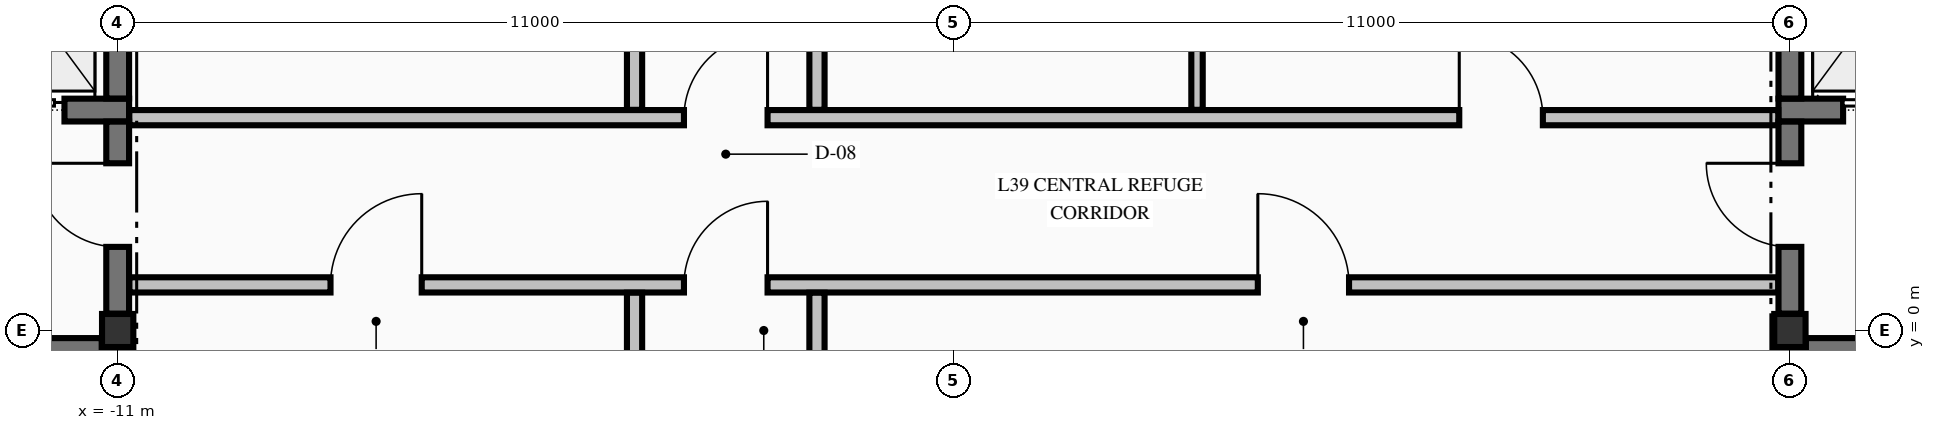
"""IFC4 building model, lengths in metres.
Left out: names, types, materials, properties, quantities, classifications, styles, units other than length and angle.
Written with IfcOpenShell. Run it as: python <this file> out.ifc"""

import sys

from ifc_helpers import new_model, si_unit, direction, frame, frame_2d, origin, origin_2d, place, context, subcontext, project, spatial, rectangle, i_section, extrude, element, fill, save


model = new_model("IFC4")
c1 = context("Model", 3, precision=1e-05, world=origin(), true_north=direction((0.0, 1.0)))
c2 = subcontext(c1, "Body", "Model", "MODEL_VIEW")
j1 = project(units=[si_unit("LENGTHUNIT", "METRE"), si_unit("PLANEANGLEUNIT", "RADIAN")], contexts=[c1])
p1 = place(None, origin())
s1 = spatial("IfcSite", under=j1, at=p1, CompositionType="ELEMENT")
p2 = place(p1, origin())
s2 = spatial("IfcBuilding", under=s1, at=p2, CompositionType="ELEMENT")
p3 = place(p2, frame((0.0, 0.0, 153.48)))
s3 = spatial("IfcBuildingStorey", under=s2, at=p3, CompositionType="ELEMENT", Elevation=153.48)
for number, where, z_axis, x_axis in (
    (1, (-11.0, 0.0, -0.425), (0.0, 0.0, 1.0), (1.0, 0.0, 0.0)),
    (2, (11.0, 0.0, -0.425), (0.0, 0.0, 1.0), (1.0, 0.0, 0.0)),
):
    element("IfcColumn", number, at=place(p3, frame(where, z_axis=z_axis, x_axis=x_axis)), inside=s3, PredefinedType="COLUMN", context=c2, shape_type="SweptSolid", body=[
        extrude(i_section(OverallWidth=0.412, OverallDepth=0.435, WebThickness=0.036, FlangeThickness=0.058, FilletRadius=0.015, at=origin_2d()), origin(), (0.0, 0.0, 1.0), 4.76),
    ])
p4 = place(p3, frame((-19.79, -0.25, 0.0), z_axis=(0.0, 0.0, 1.0), x_axis=(1.0, 0.0, 0.0)))
e3 = element("IfcWall", 3, at=p4, inside=s3, PredefinedType="SHEAR", context=c2, shape_type="SweptSolid", body=[
    extrude(rectangle(XDim=8.58, YDim=0.3, at=frame_2d((4.29, 0.0))), origin(), (0.0, 0.0, 1.0), 4.335),
])
p5 = place(p4, frame((6.09, 0.0, 0.0)))
e4 = element("IfcOpeningElement", 4, at=p5, cuts=e3, PredefinedType="OPENING", context=c2, shape_type="SweptSolid", body=[
    extrude(rectangle(XDim=1.1, YDim=2.15, at=frame_2d((0.55, 1.075))), frame((0.0, 0.16, 0.0), z_axis=(0.0, -1.0, 0.0), x_axis=(1.0, 0.0, 0.0)), (0.0, 0.0, 1.0), 0.32),
])
p6 = place(p3, frame((11.21, -0.25, 0.0), z_axis=(0.0, 0.0, 1.0), x_axis=(1.0, 0.0, 0.0)))
e5 = element("IfcWall", 5, at=p6, inside=s3, PredefinedType="SHEAR", context=c2, shape_type="SweptSolid", body=[
    extrude(rectangle(XDim=3.665, YDim=0.3, at=frame_2d((1.833, 0.0))), origin(), (0.0, 0.0, 1.0), 4.335),
])
p7 = place(p6, frame((1.39, 0.0, 0.0)))
e6 = element("IfcOpeningElement", 6, at=p7, cuts=e5, PredefinedType="OPENING", context=c2, shape_type="SweptSolid", body=[
    extrude(rectangle(XDim=1.1, YDim=2.15, at=frame_2d((0.55, 1.075))), frame((0.0, 0.16, 0.0), z_axis=(0.0, -1.0, 0.0), x_axis=(1.0, 0.0, 0.0)), (0.0, 0.0, 1.0), 0.32),
])
p8 = place(p3, frame((-14.875, 2.9, 0.0), z_axis=(0.0, 0.0, 1.0), x_axis=(1.0, 0.0, 0.0)))
e7 = element("IfcWall", 7, at=p8, inside=s3, PredefinedType="SHEAR", context=c2, shape_type="SweptSolid", body=[
    extrude(rectangle(XDim=4.025, YDim=0.3, at=frame_2d((2.012, 0.0))), origin(), (0.0, 0.0, 1.0), 4.335),
])
p9 = place(p8, frame((2.075, 0.0, 0.0)))
e8 = element("IfcOpeningElement", 8, at=p9, cuts=e7, PredefinedType="OPENING", context=c2, shape_type="SweptSolid", body=[
    extrude(rectangle(XDim=1.1, YDim=2.2, at=frame_2d((0.55, 1.1))), frame((0.0, 0.16, 0.0), z_axis=(0.0, -1.0, 0.0), x_axis=(1.0, 0.0, 0.0)), (0.0, 0.0, 1.0), 0.32),
])
p10 = place(p3, frame((10.85, 2.9, 0.0), z_axis=(0.0, 0.0, 1.0), x_axis=(1.0, 0.0, 0.0)))
e9 = element("IfcWall", 9, at=p10, inside=s3, PredefinedType="SHEAR", context=c2, shape_type="SweptSolid", body=[
    extrude(rectangle(XDim=4.025, YDim=0.3, at=frame_2d((2.012, 0.0))), origin(), (0.0, 0.0, 1.0), 4.335),
])
p11 = place(p10, frame((0.85, 0.0, 0.0)))
e10 = element("IfcOpeningElement", 10, at=p11, cuts=e9, PredefinedType="OPENING", context=c2, shape_type="SweptSolid", body=[
    extrude(rectangle(XDim=1.1, YDim=2.2, at=frame_2d((0.55, 1.1))), frame((0.0, 0.16, 0.0), z_axis=(0.0, -1.0, 0.0), x_axis=(1.0, 0.0, 0.0)), (0.0, 0.0, 1.0), 0.32),
])
p12 = place(p3, frame((-10.847, 0.6, 0.0), z_axis=(0.0, 0.0, 1.0), x_axis=(1.0, 0.0, 0.0)))
e11 = element("IfcWall", 11, at=p12, inside=s3, PredefinedType="PARTITIONING", context=c2, shape_type="SweptSolid", body=[
    extrude(rectangle(XDim=21.694, YDim=0.2, at=frame_2d((10.847, 0.0))), origin(), (0.0, 0.0, 1.0), 4.335),
])
p13 = place(p12, frame((7.297, 0.0, 0.0)))
e12 = element("IfcOpeningElement", 12, at=p13, cuts=e11, PredefinedType="OPENING", context=c2, shape_type="SweptSolid", body=[
    extrude(rectangle(XDim=1.1, YDim=2.15, at=frame_2d((0.55, 1.075))), frame((0.0, 0.11, 0.0), z_axis=(0.0, -1.0, 0.0), x_axis=(1.0, 0.0, 0.0)), (0.0, 0.0, 1.0), 0.22),
])
p14 = place(p12, frame((2.647, 0.0, 0.0)))
e13 = element("IfcOpeningElement", 13, at=p14, cuts=e11, PredefinedType="OPENING", context=c2, shape_type="SweptSolid", body=[
    extrude(rectangle(XDim=1.2, YDim=2.15, at=frame_2d((0.6, 1.075))), frame((0.0, 0.11, 0.0), z_axis=(0.0, -1.0, 0.0), x_axis=(1.0, 0.0, 0.0)), (0.0, 0.0, 1.0), 0.22),
])
p15 = place(p12, frame((14.847, 0.0, 0.0)))
e14 = element("IfcOpeningElement", 14, at=p15, cuts=e11, PredefinedType="OPENING", context=c2, shape_type="SweptSolid", body=[
    extrude(rectangle(XDim=1.2, YDim=2.15, at=frame_2d((0.6, 1.075))), frame((0.0, 0.11, 0.0), z_axis=(0.0, -1.0, 0.0), x_axis=(1.0, 0.0, 0.0)), (0.0, 0.0, 1.0), 0.22),
])
p16 = place(p3, frame((-10.847, 2.8, 0.0), z_axis=(0.0, 0.0, 1.0), x_axis=(1.0, 0.0, 0.0)))
e15 = element("IfcWall", 15, at=p16, inside=s3, PredefinedType="PARTITIONING", context=c2, shape_type="SweptSolid", body=[
    extrude(rectangle(XDim=21.694, YDim=0.2, at=frame_2d((10.847, 0.0))), origin(), (0.0, 0.0, 1.0), 4.335),
])
p17 = place(p16, frame((7.297, 0.0, 0.0)))
e16 = element("IfcOpeningElement", 16, at=p17, cuts=e15, PredefinedType="OPENING", context=c2, shape_type="SweptSolid", body=[
    extrude(rectangle(XDim=1.1, YDim=2.15, at=frame_2d((0.55, 1.075))), frame((0.0, 0.11, 0.0), z_axis=(0.0, -1.0, 0.0), x_axis=(1.0, 0.0, 0.0)), (0.0, 0.0, 1.0), 0.22),
])
p18 = place(p16, frame((17.497, 0.0, 0.0)))
e17 = element("IfcOpeningElement", 17, at=p18, cuts=e15, PredefinedType="OPENING", context=c2, shape_type="SweptSolid", body=[
    extrude(rectangle(XDim=1.1, YDim=2.15, at=frame_2d((0.55, 1.075))), frame((0.0, 0.11, 0.0), z_axis=(0.0, -1.0, 0.0), x_axis=(1.0, 0.0, 0.0)), (0.0, 0.0, 1.0), 0.22),
])
p19 = place(p3, frame((-11.0, -9.729, 0.0), z_axis=(0.0, 0.0, 1.0), x_axis=(0.0, 1.0, 0.0)))
e18 = element("IfcWall", 18, at=p19, inside=s3, PredefinedType="SHEAR", context=c2, shape_type="SweptSolid", body=[
    extrude(rectangle(XDim=9.507, YDim=0.3, at=frame_2d((4.753, 0.0))), origin(), (0.0, 0.0, 1.0), 4.335),
])
p20 = place(p3, frame((-11.0, 0.221, 0.0), z_axis=(0.0, 0.0, 1.0), x_axis=(0.0, 1.0, 0.0)))
e19 = element("IfcWall", 19, at=p20, inside=s3, PredefinedType="SHEAR", context=c2, shape_type="SweptSolid", body=[
    extrude(rectangle(XDim=2.527, YDim=0.3, at=frame_2d((1.263, 0.0))), origin(), (0.0, 0.0, 1.0), 4.335),
])
p21 = place(p20, frame((0.878, 0.0, 0.0)))
e20 = element("IfcOpeningElement", 20, at=p21, cuts=e19, PredefinedType="OPENING", context=c2, shape_type="SweptSolid", body=[
    extrude(rectangle(XDim=1.1, YDim=2.15, at=frame_2d((0.55, 1.075))), frame((0.0, 0.16, 0.0), z_axis=(0.0, -1.0, 0.0), x_axis=(1.0, 0.0, 0.0)), (0.0, 0.0, 1.0), 0.32),
])
p22 = place(p3, frame((-11.0, 3.052, 0.0), z_axis=(0.0, 0.0, 1.0), x_axis=(0.0, 1.0, 0.0)))
e21 = element("IfcWall", 21, at=p22, inside=s3, PredefinedType="SHEAR", context=c2, shape_type="SweptSolid", body=[
    extrude(rectangle(XDim=2.496, YDim=0.3, at=frame_2d((1.248, 0.0))), origin(), (0.0, 0.0, 1.0), 4.335),
])
p23 = place(p3, frame((11.0, -9.729, 0.0), z_axis=(0.0, 0.0, 1.0), x_axis=(0.0, 1.0, 0.0)))
e22 = element("IfcWall", 22, at=p23, inside=s3, PredefinedType="SHEAR", context=c2, shape_type="SweptSolid", body=[
    extrude(rectangle(XDim=9.507, YDim=0.3, at=frame_2d((4.753, 0.0))), origin(), (0.0, 0.0, 1.0), 4.335),
])
p24 = place(p3, frame((11.0, 0.221, 0.0), z_axis=(0.0, 0.0, 1.0), x_axis=(0.0, 1.0, 0.0)))
e23 = element("IfcWall", 23, at=p24, inside=s3, PredefinedType="SHEAR", context=c2, shape_type="SweptSolid", body=[
    extrude(rectangle(XDim=2.527, YDim=0.3, at=frame_2d((1.263, 0.0))), origin(), (0.0, 0.0, 1.0), 4.335),
])
p25 = place(p24, frame((0.878, 0.0, 0.0)))
e24 = element("IfcOpeningElement", 24, at=p25, cuts=e23, PredefinedType="OPENING", context=c2, shape_type="SweptSolid", body=[
    extrude(rectangle(XDim=1.1, YDim=2.15, at=frame_2d((0.55, 1.075))), frame((0.0, 0.16, 0.0), z_axis=(0.0, -1.0, 0.0), x_axis=(1.0, 0.0, 0.0)), (0.0, 0.0, 1.0), 0.32),
])
p26 = place(p3, frame((11.0, 3.052, 0.0), z_axis=(0.0, 0.0, 1.0), x_axis=(0.0, 1.0, 0.0)))
e25 = element("IfcWall", 25, at=p26, inside=s3, PredefinedType="SHEAR", context=c2, shape_type="SweptSolid", body=[
    extrude(rectangle(XDim=2.496, YDim=0.3, at=frame_2d((1.248, 0.0))), origin(), (0.0, 0.0, 1.0), 4.335),
])
p27 = place(p3, frame((-4.2, -9.847, 0.0), z_axis=(0.0, 0.0, 1.0), x_axis=(0.0, 1.0, 0.0)))
e26 = element("IfcWall", 26, at=p27, inside=s3, PredefinedType="PARTITIONING", context=c2, shape_type="SweptSolid", body=[
    extrude(rectangle(XDim=10.344, YDim=0.2, at=frame_2d((5.172, 0.0))), origin(), (0.0, 0.0, 1.0), 4.335),
])
p28 = place(p3, frame((-4.2, 2.903, 0.0), z_axis=(0.0, 0.0, 1.0), x_axis=(0.0, 1.0, 0.0)))
e27 = element("IfcWall", 27, at=p28, inside=s3, PredefinedType="PARTITIONING", context=c2, shape_type="SweptSolid", body=[
    extrude(rectangle(XDim=3.644, YDim=0.2, at=frame_2d((1.822, 0.0))), origin(), (0.0, 0.0, 1.0), 4.335),
])
p29 = place(p28, frame((1.322, 0.0, 0.0)))
e28 = element("IfcOpeningElement", 28, at=p29, cuts=e27, PredefinedType="OPENING", context=c2, shape_type="SweptSolid", body=[
    extrude(rectangle(XDim=0.95, YDim=2.15, at=frame_2d((0.475, 1.075))), frame((0.0, 0.11, 0.0), z_axis=(0.0, -1.0, 0.0), x_axis=(1.0, 0.0, 0.0)), (0.0, 0.0, 1.0), 0.22),
])
p30 = place(p3, frame((-1.8, -9.847, 0.0), z_axis=(0.0, 0.0, 1.0), x_axis=(0.0, 1.0, 0.0)))
e29 = element("IfcWall", 29, at=p30, inside=s3, PredefinedType="PARTITIONING", context=c2, shape_type="SweptSolid", body=[
    extrude(rectangle(XDim=10.344, YDim=0.2, at=frame_2d((5.172, 0.0))), origin(), (0.0, 0.0, 1.0), 4.335),
])
p31 = place(p3, frame((-1.8, 2.903, 0.0), z_axis=(0.0, 0.0, 1.0), x_axis=(0.0, 1.0, 0.0)))
e30 = element("IfcWall", 30, at=p31, inside=s3, PredefinedType="PARTITIONING", context=c2, shape_type="SweptSolid", body=[
    extrude(rectangle(XDim=3.594, YDim=0.2, at=frame_2d((1.797, 0.0))), origin(), (0.0, 0.0, 1.0), 4.335),
])
p32 = place(p31, frame((1.322, 0.0, 0.0)))
e31 = element("IfcOpeningElement", 31, at=p32, cuts=e30, PredefinedType="OPENING", context=c2, shape_type="SweptSolid", body=[
    extrude(rectangle(XDim=0.95, YDim=2.15, at=frame_2d((0.475, 1.075))), frame((0.0, 0.11, 0.0), z_axis=(0.0, -1.0, 0.0), x_axis=(1.0, 0.0, 0.0)), (0.0, 0.0, 1.0), 0.22),
])
p33 = place(p3, frame((3.2, 2.903, 0.0), z_axis=(0.0, 0.0, 1.0), x_axis=(0.0, 1.0, 0.0)))
e32 = element("IfcWall", 32, at=p33, inside=s3, PredefinedType="PARTITIONING", context=c2, shape_type="SweptSolid", body=[
    extrude(rectangle(XDim=3.594, YDim=0.15, at=frame_2d((1.797, 0.0))), origin(), (0.0, 0.0, 1.0), 4.335),
])
p34 = place(p21, origin())
e33 = element("IfcDoor", 33, at=p34, inside=s3, OperationType="SINGLE_SWING_RIGHT", PredefinedType="DOOR", context=c2, shape_type="SweptSolid", body=[
    extrude(rectangle(XDim=1.1, YDim=2.15, at=frame_2d((0.55, 1.075))), frame((0.0, 0.025, 0.0), z_axis=(0.0, -1.0, 0.0), x_axis=(1.0, 0.0, 0.0)), (0.0, 0.0, 1.0), 0.05),
])
fill(e20, e33)
p35 = place(p9, origin())
e34 = element("IfcDoor", 34, at=p35, inside=s3, OperationType="SLIDING_TO_LEFT", PredefinedType="DOOR", context=c2, shape_type="SweptSolid", body=[
    extrude(rectangle(XDim=1.1, YDim=2.2, at=frame_2d((0.55, 1.1))), frame((0.0, 0.025, 0.0), z_axis=(0.0, -1.0, 0.0), x_axis=(1.0, 0.0, 0.0)), (0.0, 0.0, 1.0), 0.05),
])
fill(e8, e34)
p36 = place(p25, origin())
e35 = element("IfcDoor", 35, at=p36, inside=s3, OperationType="SINGLE_SWING_RIGHT", PredefinedType="DOOR", context=c2, shape_type="SweptSolid", body=[
    extrude(rectangle(XDim=1.1, YDim=2.15, at=frame_2d((0.55, 1.075))), frame((0.0, 0.025, 0.0), z_axis=(0.0, -1.0, 0.0), x_axis=(1.0, 0.0, 0.0)), (0.0, 0.0, 1.0), 0.05),
])
fill(e24, e35)
p37 = place(p11, origin())
e36 = element("IfcDoor", 36, at=p37, inside=s3, OperationType="SLIDING_TO_RIGHT", PredefinedType="DOOR", context=c2, shape_type="SweptSolid", body=[
    extrude(rectangle(XDim=1.1, YDim=2.2, at=frame_2d((0.55, 1.1))), frame((0.0, 0.025, 0.0), z_axis=(0.0, -1.0, 0.0), x_axis=(1.0, 0.0, 0.0)), (0.0, 0.0, 1.0), 0.05),
])
fill(e10, e36)
p38 = place(p17, origin())
e37 = element("IfcDoor", 37, at=p38, inside=s3, OperationType="SINGLE_SWING_RIGHT", PredefinedType="DOOR", context=c2, shape_type="SweptSolid", body=[
    extrude(rectangle(XDim=1.1, YDim=2.15, at=frame_2d((0.55, 1.075))), frame((0.0, 0.025, 0.0), z_axis=(0.0, -1.0, 0.0), x_axis=(1.0, 0.0, 0.0)), (0.0, 0.0, 1.0), 0.05),
])
fill(e16, e37)
p39 = place(p13, origin())
e38 = element("IfcDoor", 38, at=p39, inside=s3, OperationType="SINGLE_SWING_RIGHT", PredefinedType="DOOR", context=c2, shape_type="SweptSolid", body=[
    extrude(rectangle(XDim=1.1, YDim=2.15, at=frame_2d((0.55, 1.075))), frame((0.0, 0.025, 0.0), z_axis=(0.0, -1.0, 0.0), x_axis=(1.0, 0.0, 0.0)), (0.0, 0.0, 1.0), 0.05),
])
fill(e12, e38)
p40 = place(p14, origin())
e39 = element("IfcDoor", 39, at=p40, inside=s3, OperationType="SINGLE_SWING_RIGHT", PredefinedType="DOOR", context=c2, shape_type="SweptSolid", body=[
    extrude(rectangle(XDim=1.2, YDim=2.15, at=frame_2d((0.6, 1.075))), frame((0.0, 0.025, 0.0), z_axis=(0.0, -1.0, 0.0), x_axis=(1.0, 0.0, 0.0)), (0.0, 0.0, 1.0), 0.05),
])
fill(e13, e39)
p41 = place(p15, origin())
e40 = element("IfcDoor", 40, at=p41, inside=s3, OperationType="SINGLE_SWING_LEFT", PredefinedType="DOOR", context=c2, shape_type="SweptSolid", body=[
    extrude(rectangle(XDim=1.2, YDim=2.15, at=frame_2d((0.6, 1.075))), frame((0.0, 0.025, 0.0), z_axis=(0.0, -1.0, 0.0), x_axis=(1.0, 0.0, 0.0)), (0.0, 0.0, 1.0), 0.05),
])
fill(e14, e40)
p42 = place(p18, origin())
e41 = element("IfcDoor", 41, at=p42, inside=s3, OperationType="SINGLE_SWING_LEFT", PredefinedType="DOOR", context=c2, shape_type="SweptSolid", body=[
    extrude(rectangle(XDim=1.1, YDim=2.15, at=frame_2d((0.55, 1.075))), frame((0.0, 0.025, 0.0), z_axis=(0.0, -1.0, 0.0), x_axis=(1.0, 0.0, 0.0)), (0.0, 0.0, 1.0), 0.05),
])
fill(e17, e41)
save(model, sys.argv[1])
